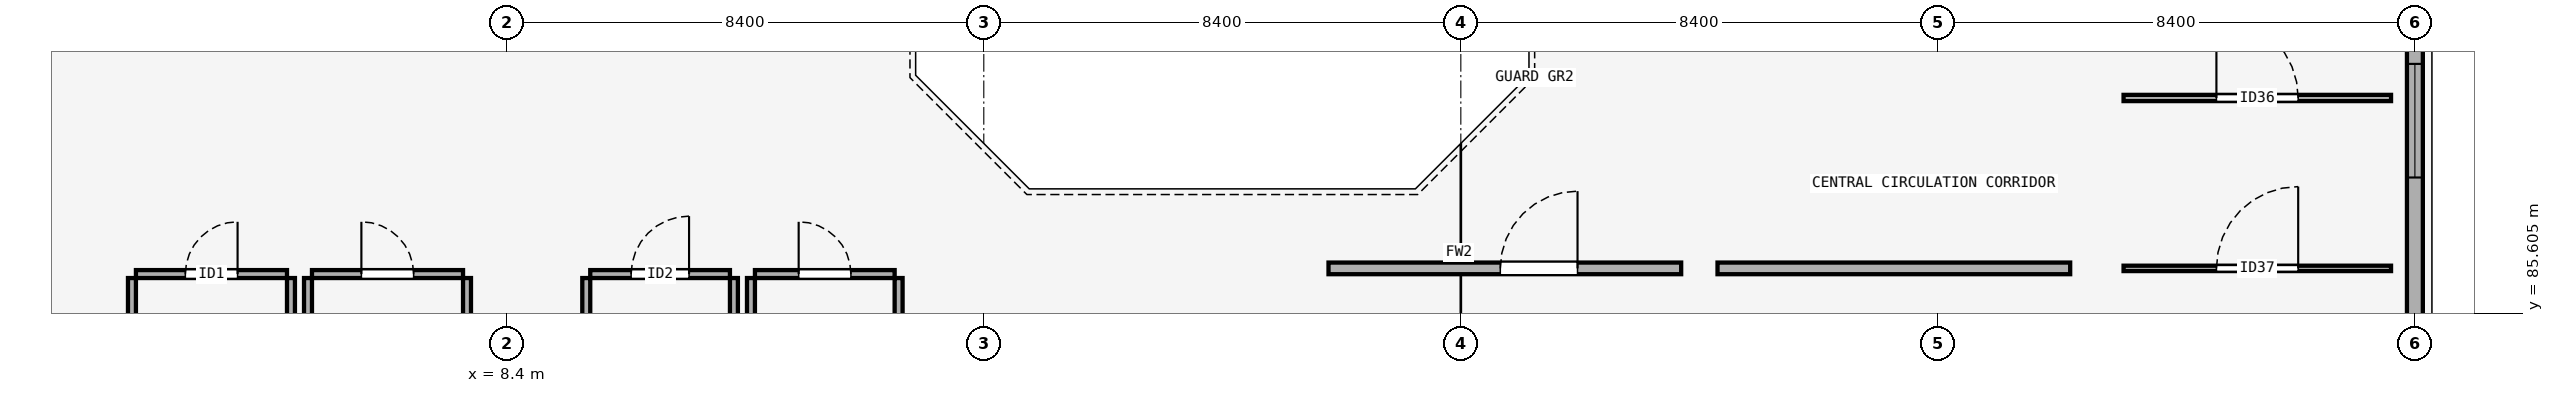
"""IFC4 building model, lengths in metres.
Left out: names, types, materials, properties, quantities, classifications, styles, units other than length and angle.
Written with IfcOpenShell. Run it as: python <this file> out.ifc"""

import sys

from ifc_helpers import new_model, si_unit, direction, frame, frame_2d, origin, place, context, subcontext, project, spatial, rectangle, extrude, element, fill, save


model = new_model("IFC4")
c1 = context("Model", 3, precision=1e-05, world=origin(), true_north=direction((0.0, 1.0)))
c2 = subcontext(c1, "Body", "Model", "MODEL_VIEW")
j1 = project(units=[si_unit("LENGTHUNIT", "METRE"), si_unit("PLANEANGLEUNIT", "RADIAN")], contexts=[c1])
p1 = place(None, origin())
s1 = spatial("IfcSite", under=j1, at=p1, CompositionType="ELEMENT")
p2 = place(p1, origin())
s2 = spatial("IfcBuilding", under=s1, at=p2, CompositionType="ELEMENT")
p3 = place(p2, frame((0.0, 0.0, 23.4)))
s3 = spatial("IfcBuildingStorey", under=s2, at=p3, CompositionType="ELEMENT", Elevation=23.4)
p4 = place(p3, frame((42.0, 85.175, 0.0), z_axis=(0.0, 0.0, 1.0), x_axis=(0.0, 1.0, 0.0)))
e1 = element("IfcWall", 1, at=p4, inside=s3, PredefinedType="SOLIDWALL", context=c2, shape_type="SweptSolid", body=[
    extrude(rectangle(XDim=7.65, YDim=0.28, at=frame_2d((3.825, 0.0))), origin(), (0.0, 0.0, 1.0), 3.45),
])
p5 = place(p4, frame((2.825, 0.0, 0.95)))
e2 = element("IfcOpeningElement", 2, at=p5, cuts=e1, PredefinedType="OPENING", context=c2, shape_type="SweptSolid", body=[
    extrude(rectangle(XDim=2.0, YDim=1.35, at=frame_2d((1.0, 0.675))), frame((0.0, 0.15, 0.0), z_axis=(0.0, -1.0, 0.0), x_axis=(1.0, 0.0, 0.0)), (0.0, 0.0, 1.0), 0.3),
])
p6 = place(p3, frame((1.87, 86.3, 0.0), z_axis=(0.0, 0.0, 1.0), x_axis=(1.0, 0.0, 0.0)))
e3 = element("IfcWall", 3, at=p6, inside=s3, PredefinedType="PARTITIONING", context=c2, shape_type="SweptSolid", body=[
    extrude(rectangle(XDim=2.66, YDim=0.14, at=frame_2d((1.33, 0.0))), origin(), (0.0, 0.0, 1.0), 4.2),
])
p7 = place(p6, frame((0.87, 0.0, 0.0)))
e4 = element("IfcOpeningElement", 4, at=p7, cuts=e3, PredefinedType="OPENING", context=c2, shape_type="SweptSolid", body=[
    extrude(rectangle(XDim=0.92, YDim=2.12, at=frame_2d((0.46, 1.06))), frame((0.0, 0.08, 0.0), z_axis=(0.0, -1.0, 0.0), x_axis=(1.0, 0.0, 0.0)), (0.0, 0.0, 1.0), 0.16),
])
for number, where, z_axis, x_axis in (
    (5, (1.8, 83.87, 0.0), (0.0, 0.0, 1.0), (0.0, 1.0, 0.0)),
    (6, (4.6, 83.87, 0.0), (0.0, 0.0, 1.0), (0.0, 1.0, 0.0)),
):
    element("IfcWall", number, at=place(p3, frame(where, z_axis=z_axis, x_axis=x_axis)), inside=s3, PredefinedType="PARTITIONING", context=c2, shape_type="SweptSolid", body=[
        extrude(rectangle(XDim=2.36, YDim=0.14, at=frame_2d((1.18, 0.0))), origin(), (0.0, 0.0, 1.0), 3.45),
    ])
p8 = place(p3, frame((4.97, 86.3, 0.0), z_axis=(0.0, 0.0, 1.0), x_axis=(1.0, 0.0, 0.0)))
e7 = element("IfcWall", 7, at=p8, inside=s3, PredefinedType="PARTITIONING", context=c2, shape_type="SweptSolid", body=[
    extrude(rectangle(XDim=2.66, YDim=0.14, at=frame_2d((1.33, 0.0))), origin(), (0.0, 0.0, 1.0), 4.2),
])
p9 = place(p8, frame((0.87, 0.0, 0.0)))
e8 = element("IfcOpeningElement", 8, at=p9, cuts=e7, PredefinedType="OPENING", context=c2, shape_type="SweptSolid", body=[
    extrude(rectangle(XDim=0.92, YDim=2.12, at=frame_2d((0.46, 1.06))), frame((0.0, 0.08, 0.0), z_axis=(0.0, -1.0, 0.0), x_axis=(1.0, 0.0, 0.0)), (0.0, 0.0, 1.0), 0.16),
])
for number, where, z_axis, x_axis in (
    (9, (4.9, 83.87, 0.0), (0.0, 0.0, 1.0), (0.0, 1.0, 0.0)),
    (10, (7.7, 83.87, 0.0), (0.0, 0.0, 1.0), (0.0, 1.0, 0.0)),
):
    element("IfcWall", number, at=place(p3, frame(where, z_axis=z_axis, x_axis=x_axis)), inside=s3, PredefinedType="PARTITIONING", context=c2, shape_type="SweptSolid", body=[
        extrude(rectangle(XDim=2.36, YDim=0.14, at=frame_2d((1.18, 0.0))), origin(), (0.0, 0.0, 1.0), 3.45),
    ])
p10 = place(p3, frame((9.87, 86.3, 0.0), z_axis=(0.0, 0.0, 1.0), x_axis=(1.0, 0.0, 0.0)))
e11 = element("IfcWall", 11, at=p10, inside=s3, PredefinedType="PARTITIONING", context=c2, shape_type="SweptSolid", body=[
    extrude(rectangle(XDim=2.46, YDim=0.14, at=frame_2d((1.23, 0.0))), origin(), (0.0, 0.0, 1.0), 4.2),
])
p11 = place(p10, frame((0.72, 0.0, 0.0)))
e12 = element("IfcOpeningElement", 12, at=p11, cuts=e11, PredefinedType="OPENING", context=c2, shape_type="SweptSolid", body=[
    extrude(rectangle(XDim=1.02, YDim=2.15, at=frame_2d((0.51, 1.075))), frame((0.0, 0.08, 0.0), z_axis=(0.0, -1.0, 0.0), x_axis=(1.0, 0.0, 0.0)), (0.0, 0.0, 1.0), 0.16),
])
for number, where, z_axis, x_axis in (
    (13, (9.8, 83.87, 0.0), (0.0, 0.0, 1.0), (0.0, 1.0, 0.0)),
    (14, (12.4, 83.87, 0.0), (0.0, 0.0, 1.0), (0.0, 1.0, 0.0)),
):
    element("IfcWall", number, at=place(p3, frame(where, z_axis=z_axis, x_axis=x_axis)), inside=s3, PredefinedType="PARTITIONING", context=c2, shape_type="SweptSolid", body=[
        extrude(rectangle(XDim=2.36, YDim=0.14, at=frame_2d((1.18, 0.0))), origin(), (0.0, 0.0, 1.0), 3.45),
    ])
p12 = place(p3, frame((12.77, 86.3, 0.0), z_axis=(0.0, 0.0, 1.0), x_axis=(1.0, 0.0, 0.0)))
e15 = element("IfcWall", 15, at=p12, inside=s3, PredefinedType="PARTITIONING", context=c2, shape_type="SweptSolid", body=[
    extrude(rectangle(XDim=2.46, YDim=0.14, at=frame_2d((1.23, 0.0))), origin(), (0.0, 0.0, 1.0), 4.2),
])
p13 = place(p12, frame((0.77, 0.0, 0.0)))
e16 = element("IfcOpeningElement", 16, at=p13, cuts=e15, PredefinedType="OPENING", context=c2, shape_type="SweptSolid", body=[
    extrude(rectangle(XDim=0.92, YDim=2.12, at=frame_2d((0.46, 1.06))), frame((0.0, 0.08, 0.0), z_axis=(0.0, -1.0, 0.0), x_axis=(1.0, 0.0, 0.0)), (0.0, 0.0, 1.0), 0.16),
])
for number, where, z_axis, x_axis in (
    (17, (12.7, 83.87, 0.0), (0.0, 0.0, 1.0), (0.0, 1.0, 0.0)),
    (18, (15.3, 83.87, 0.0), (0.0, 0.0, 1.0), (0.0, 1.0, 0.0)),
):
    element("IfcWall", number, at=place(p3, frame(where, z_axis=z_axis, x_axis=x_axis)), inside=s3, PredefinedType="PARTITIONING", context=c2, shape_type="SweptSolid", body=[
        extrude(rectangle(XDim=2.36, YDim=0.14, at=frame_2d((1.18, 0.0))), origin(), (0.0, 0.0, 1.0), 3.45),
    ])
p14 = place(p3, frame((22.87, 86.4, 0.0), z_axis=(0.0, 0.0, 1.0), x_axis=(1.0, 0.0, 0.0)))
e19 = element("IfcWall", 19, at=p14, inside=s3, PredefinedType="PARTITIONING", context=c2, shape_type="SweptSolid", body=[
    extrude(rectangle(XDim=6.21, YDim=0.205, at=frame_2d((3.105, 0.0))), origin(), (0.0, 0.0, 1.0), 4.2),
])
p15 = place(p14, frame((3.025, 0.0, 0.0)))
e20 = element("IfcOpeningElement", 20, at=p15, cuts=e19, PredefinedType="OPENING", context=c2, shape_type="SweptSolid", body=[
    extrude(rectangle(XDim=1.36, YDim=2.34, at=frame_2d((0.68, 1.17))), frame((0.0, 0.113, 0.0), z_axis=(0.0, -1.0, 0.0), x_axis=(1.0, 0.0, 0.0)), (0.0, 0.0, 1.0), 0.225),
])
p16 = place(p3, frame((29.72, 86.4, 0.0), z_axis=(0.0, 0.0, 1.0), x_axis=(1.0, 0.0, 0.0)))
e21 = element("IfcWall", 21, at=p16, inside=s3, PredefinedType="PARTITIONING", context=c2, shape_type="SweptSolid", body=[
    extrude(rectangle(XDim=6.21, YDim=0.205, at=frame_2d((3.105, 0.0))), origin(), (0.0, 0.0, 1.0), 3.45),
])
p17 = place(p3, frame((36.87, 89.4, 0.0), z_axis=(0.0, 0.0, 1.0), x_axis=(1.0, 0.0, 0.0)))
e22 = element("IfcWall", 22, at=p17, inside=s3, PredefinedType="PARTITIONING", context=c2, shape_type="SweptSolid", body=[
    extrude(rectangle(XDim=4.71, YDim=0.11, at=frame_2d((2.355, 0.0))), origin(), (0.0, 0.0, 1.0), 4.2),
])
p18 = place(p17, frame((1.635, 0.0, 0.0)))
e23 = element("IfcOpeningElement", 23, at=p18, cuts=e22, PredefinedType="OPENING", context=c2, shape_type="SweptSolid", body=[
    extrude(rectangle(XDim=1.44, YDim=2.22, at=frame_2d((0.72, 1.11))), frame((0.0, 0.065, 0.0), z_axis=(0.0, -1.0, 0.0), x_axis=(1.0, 0.0, 0.0)), (0.0, 0.0, 1.0), 0.13),
])
p19 = place(p3, frame((36.87, 86.4, 0.0), z_axis=(0.0, 0.0, 1.0), x_axis=(1.0, 0.0, 0.0)))
e24 = element("IfcWall", 24, at=p19, inside=s3, PredefinedType="PARTITIONING", context=c2, shape_type="SweptSolid", body=[
    extrude(rectangle(XDim=4.71, YDim=0.095, at=frame_2d((2.355, 0.0))), origin(), (0.0, 0.0, 1.0), 4.2),
])
p20 = place(p19, frame((1.635, 0.0, 0.0)))
e25 = element("IfcOpeningElement", 25, at=p20, cuts=e24, PredefinedType="OPENING", context=c2, shape_type="SweptSolid", body=[
    extrude(rectangle(XDim=1.44, YDim=2.34, at=frame_2d((0.72, 1.17))), frame((0.0, 0.057, 0.0), z_axis=(0.0, -1.0, 0.0), x_axis=(1.0, 0.0, 0.0)), (0.0, 0.0, 1.0), 0.115),
])
p21 = place(p5, origin())
e26 = element("IfcWindow", 26, at=p21, inside=s3, PartitioningType="DOUBLE_PANEL_VERTICAL", PredefinedType="WINDOW", context=c2, shape_type="SweptSolid", body=[
    extrude(rectangle(XDim=2.0, YDim=1.35, at=frame_2d((1.0, 0.675))), frame((0.0, 0.03, 0.0), z_axis=(0.0, -1.0, 0.0), x_axis=(1.0, 0.0, 0.0)), (0.0, 0.0, 1.0), 0.06),
])
fill(e2, e26)
p22 = place(p7, origin())
e27 = element("IfcDoor", 27, at=p22, inside=s3, OperationType="SINGLE_SWING_RIGHT", PredefinedType="DOOR", context=c2, shape_type="SweptSolid", body=[
    extrude(rectangle(XDim=0.92, YDim=2.12, at=frame_2d((0.46, 1.06))), frame((0.0, 0.025, 0.0), z_axis=(0.0, -1.0, 0.0), x_axis=(1.0, 0.0, 0.0)), (0.0, 0.0, 1.0), 0.05),
])
fill(e4, e27)
p23 = place(p9, origin())
e28 = element("IfcDoor", 28, at=p23, inside=s3, OperationType="SINGLE_SWING_LEFT", PredefinedType="DOOR", context=c2, shape_type="SweptSolid", body=[
    extrude(rectangle(XDim=0.92, YDim=2.12, at=frame_2d((0.46, 1.06))), frame((0.0, 0.025, 0.0), z_axis=(0.0, -1.0, 0.0), x_axis=(1.0, 0.0, 0.0)), (0.0, 0.0, 1.0), 0.05),
])
fill(e8, e28)
p24 = place(p11, origin())
e29 = element("IfcDoor", 29, at=p24, inside=s3, OperationType="SINGLE_SWING_RIGHT", PredefinedType="DOOR", context=c2, shape_type="SweptSolid", body=[
    extrude(rectangle(XDim=1.02, YDim=2.15, at=frame_2d((0.51, 1.075))), frame((0.0, 0.025, 0.0), z_axis=(0.0, -1.0, 0.0), x_axis=(1.0, 0.0, 0.0)), (0.0, 0.0, 1.0), 0.05),
])
fill(e12, e29)
p25 = place(p13, origin())
e30 = element("IfcDoor", 30, at=p25, inside=s3, OperationType="SINGLE_SWING_LEFT", PredefinedType="DOOR", context=c2, shape_type="SweptSolid", body=[
    extrude(rectangle(XDim=0.92, YDim=2.12, at=frame_2d((0.46, 1.06))), frame((0.0, 0.025, 0.0), z_axis=(0.0, -1.0, 0.0), x_axis=(1.0, 0.0, 0.0)), (0.0, 0.0, 1.0), 0.05),
])
fill(e16, e30)
p26 = place(p15, origin())
e31 = element("IfcDoor", 31, at=p26, inside=s3, OperationType="SINGLE_SWING_RIGHT", PredefinedType="DOOR", context=c2, shape_type="SweptSolid", body=[
    extrude(rectangle(XDim=1.36, YDim=2.34, at=frame_2d((0.68, 1.17))), frame((0.0, 0.025, 0.0), z_axis=(0.0, -1.0, 0.0), x_axis=(1.0, 0.0, 0.0)), (0.0, 0.0, 1.0), 0.05),
])
fill(e20, e31)
p27 = place(p18, origin())
e32 = element("IfcDoor", 32, at=p27, inside=s3, OperationType="SINGLE_SWING_LEFT", PredefinedType="DOOR", context=c2, shape_type="SweptSolid", body=[
    extrude(rectangle(XDim=1.44, YDim=2.22, at=frame_2d((0.72, 1.11))), frame((0.0, 0.025, 0.0), z_axis=(0.0, -1.0, 0.0), x_axis=(1.0, 0.0, 0.0)), (0.0, 0.0, 1.0), 0.05),
])
fill(e23, e32)
p28 = place(p20, origin())
e33 = element("IfcDoor", 33, at=p28, inside=s3, OperationType="SINGLE_SWING_RIGHT", PredefinedType="DOOR", context=c2, shape_type="SweptSolid", body=[
    extrude(rectangle(XDim=1.44, YDim=2.34, at=frame_2d((0.72, 1.17))), frame((0.0, 0.025, 0.0), z_axis=(0.0, -1.0, 0.0), x_axis=(1.0, 0.0, 0.0)), (0.0, 0.0, 1.0), 0.05),
])
fill(e25, e33)
save(model, sys.argv[1])
